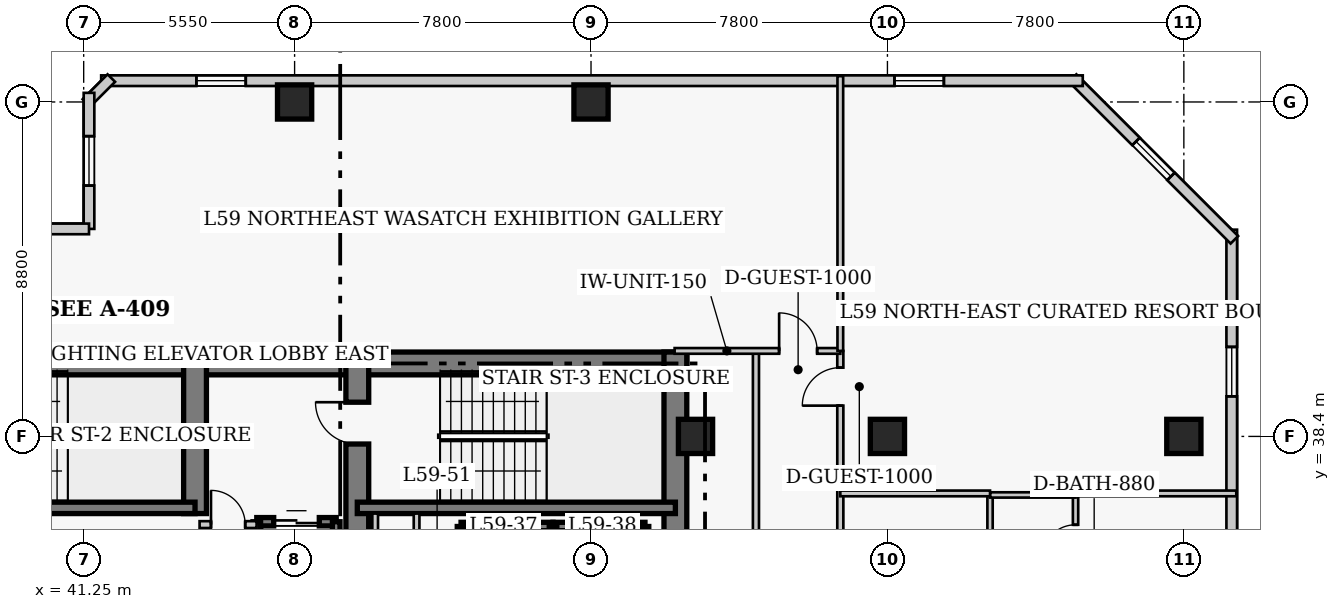
"""IFC4 building model, lengths in metres.
Left out: names, types, materials, properties, quantities, classifications, styles, units other than length and angle.
Written with IfcOpenShell. Run it as: python <this file> out.ifc"""

import sys

from ifc_helpers import new_model, si_unit, direction, frame, frame_2d, origin, origin_2d, place, context, subcontext, project, spatial, rectangle, extrude, element, fill, save


model = new_model("IFC4")
c1 = context("Model", 3, precision=1e-05, world=origin(), true_north=direction((0.0, 1.0)))
c2 = subcontext(c1, "Body", "Model", "MODEL_VIEW")
j1 = project(units=[si_unit("LENGTHUNIT", "METRE"), si_unit("PLANEANGLEUNIT", "RADIAN")], contexts=[c1])
p1 = place(None, origin())
s1 = spatial("IfcSite", under=j1, at=p1, CompositionType="ELEMENT")
p2 = place(p1, origin())
s2 = spatial("IfcBuilding", under=s1, at=p2, CompositionType="ELEMENT")
p3 = place(p2, frame((0.0, 0.0, 236.5)))
s3 = spatial("IfcBuildingStorey", under=s2, at=p3, CompositionType="ELEMENT", Elevation=236.5)
p4 = place(p3, frame((35.85, 40.32, 0.0), z_axis=(0.0, 0.0, 1.0), x_axis=(1.0, 0.0, 0.0)))
e1 = element("IfcWall", 1, at=p4, inside=s3, PredefinedType="SHEAR", context=c2, shape_type="SweptSolid", body=[
    extrude(rectangle(XDim=12.6, YDim=0.6, at=frame_2d((6.3, 0.0))), origin(), (0.0, 0.0, 1.0), 3.9),
])
p5 = place(p3, frame((48.45, 40.32, 0.0), z_axis=(0.0, 0.0, 1.0), x_axis=(1.0, 0.0, 0.0)))
e2 = element("IfcWall", 2, at=p5, inside=s3, PredefinedType="SHEAR", context=c2, shape_type="SweptSolid", body=[
    extrude(rectangle(XDim=8.67, YDim=0.6, at=frame_2d((4.335, 0.0))), origin(), (0.0, 0.0, 1.0), 3.9),
])
p6 = place(p3, frame((56.82, 27.05, 0.0), z_axis=(0.0, 0.0, 1.0), x_axis=(0.0, 1.0, 0.0)))
e3 = element("IfcWall", 3, at=p6, inside=s3, PredefinedType="SHEAR", context=c2, shape_type="SweptSolid", body=[
    extrude(rectangle(XDim=13.57, YDim=0.6, at=frame_2d((6.785, 0.0))), origin(), (0.0, 0.0, 1.0), 3.9),
])
p7 = place(p3, frame((44.18, 36.37, 0.0), z_axis=(0.0, 0.0, 1.0), x_axis=(0.0, 1.0, 0.0)))
e4 = element("IfcWall", 4, at=p7, inside=s3, PredefinedType="SHEAR", context=c2, shape_type="SweptSolid", body=[
    extrude(rectangle(XDim=3.95, YDim=0.6, at=frame_2d((1.975, 0.0))), origin(), (0.0, 0.0, 1.0), 3.9),
])
p8 = place(p3, frame((48.45, 32.45, 0.0), z_axis=(0.0, 0.0, 1.0), x_axis=(0.0, 1.0, 0.0)))
e5 = element("IfcWall", 5, at=p8, inside=s3, PredefinedType="SHEAR", context=c2, shape_type="SweptSolid", body=[
    extrude(rectangle(XDim=7.87, YDim=0.6, at=frame_2d((3.935, 0.0))), origin(), (0.0, 0.0, 1.0), 3.9),
])
p9 = place(p8, frame((5.75, 0.0, 0.0)))
e6 = element("IfcOpeningElement", 6, at=p9, cuts=e5, PredefinedType="OPENING", context=c2, shape_type="SweptSolid", body=[
    extrude(rectangle(XDim=1.1, YDim=2.15, at=frame_2d((0.55, 1.075))), frame((0.0, 0.31, 0.0), z_axis=(0.0, -1.0, 0.0), x_axis=(1.0, 0.0, 0.0)), (0.0, 0.0, 1.0), 0.62),
])
p10 = place(p3, frame((35.85, 36.52, 0.0), z_axis=(0.0, 0.0, 1.0), x_axis=(1.0, 0.0, 0.0)))
e7 = element("IfcWall", 7, at=p10, inside=s3, PredefinedType="SHEAR", context=c2, shape_type="SweptSolid", body=[
    extrude(rectangle(XDim=8.33, YDim=0.3, at=frame_2d((4.165, 0.0))), origin(), (0.0, 0.0, 1.0), 3.9),
])
p11 = place(p3, frame((48.45, 36.52, 0.0), z_axis=(0.0, 0.0, 1.0), x_axis=(1.0, 0.0, 0.0)))
e8 = element("IfcWall", 8, at=p11, inside=s3, PredefinedType="SHEAR", context=c2, shape_type="SweptSolid", body=[
    extrude(rectangle(XDim=8.37, YDim=0.3, at=frame_2d((4.185, 0.0))), origin(), (0.0, 0.0, 1.0), 3.9),
])
for number, where, z_axis, x_axis in (
    (9, (46.8, 47.2, 0.0), (0.0, 0.0, 1.0), (1.0, 0.0, 0.0)),
    (10, (54.6, 47.2, 0.0), (0.0, 0.0, 1.0), (1.0, 0.0, 0.0)),
    (11, (62.4, 38.4, 0.0), (0.0, 0.0, 1.0), (1.0, 0.0, 0.0)),
    (12, (70.2, 38.4, 0.0), (0.0, 0.0, 1.0), (1.0, 0.0, 0.0)),
    (13, (57.35, 38.4, 0.0), (0.0, 0.0, 1.0), (1.0, 0.0, 0.0)),
):
    element("IfcColumn", number, at=place(p3, frame(where, z_axis=z_axis, x_axis=x_axis)), inside=s3, PredefinedType="COLUMN", context=c2, shape_type="SweptSolid", body=[
        extrude(rectangle(XDim=0.9, YDim=0.9, at=origin_2d()), origin(), (0.0, 0.0, 1.0), 3.9),
    ])
p12 = place(p3, frame((71.46, 13.96, 0.0), z_axis=(0.0, 0.0, 1.0), x_axis=(0.0, 1.0, 0.0)))
e14 = element("IfcWall", 14, at=p12, inside=s3, PredefinedType="SOLIDWALL", context=c2, shape_type="SweptSolid", body=[
    extrude(rectangle(XDim=29.88, YDim=0.28, at=frame_2d((14.94, 0.0))), origin(), (0.0, 0.0, 1.0), 3.52),
])
p13 = place(p12, frame((3.085, 0.0, 0.85)))
e15 = element("IfcOpeningElement", 15, at=p13, cuts=e14, PredefinedType="OPENING", context=c2, shape_type="SweptSolid", body=[
    extrude(rectangle(XDim=1.3, YDim=1.7, at=frame_2d((0.65, 0.85))), frame((0.0, 0.15, 0.0), z_axis=(0.0, -1.0, 0.0), x_axis=(1.0, 0.0, 0.0)), (0.0, 0.0, 1.0), 0.3),
])
p14 = place(p12, frame((9.405, 0.0, 0.85)))
e16 = element("IfcOpeningElement", 16, at=p14, cuts=e14, PredefinedType="OPENING", context=c2, shape_type="SweptSolid", body=[
    extrude(rectangle(XDim=1.3, YDim=1.7, at=frame_2d((0.65, 0.85))), frame((0.0, 0.15, 0.0), z_axis=(0.0, -1.0, 0.0), x_axis=(1.0, 0.0, 0.0)), (0.0, 0.0, 1.0), 0.3),
])
p15 = place(p12, frame((18.025, 0.0, 0.85)))
e17 = element("IfcOpeningElement", 17, at=p15, cuts=e14, PredefinedType="OPENING", context=c2, shape_type="SweptSolid", body=[
    extrude(rectangle(XDim=1.3, YDim=1.7, at=frame_2d((0.65, 0.85))), frame((0.0, 0.15, 0.0), z_axis=(0.0, -1.0, 0.0), x_axis=(1.0, 0.0, 0.0)), (0.0, 0.0, 1.0), 0.3),
])
p16 = place(p12, frame((25.495, 0.0, 0.85)))
e18 = element("IfcOpeningElement", 18, at=p16, cuts=e14, PredefinedType="OPENING", context=c2, shape_type="SweptSolid", body=[
    extrude(rectangle(XDim=1.3, YDim=1.7, at=frame_2d((0.65, 0.85))), frame((0.0, 0.15, 0.0), z_axis=(0.0, -1.0, 0.0), x_axis=(1.0, 0.0, 0.0)), (0.0, 0.0, 1.0), 0.3),
])
p17 = place(p3, frame((71.529, 43.573, 0.0), z_axis=(0.0, 0.0, 1.0), x_axis=(-0.707106781187, 0.707106781187, 0.0)))
e19 = element("IfcWall", 19, at=p17, inside=s3, PredefinedType="SOLIDWALL", context=c2, shape_type="SweptSolid", body=[
    extrude(rectangle(XDim=6.02, YDim=0.28, at=frame_2d((3.01, 0.0))), origin(), (0.0, 0.0, 1.0), 3.52),
])
p18 = place(p17, frame((2.36, 0.0, 0.85)))
e20 = element("IfcOpeningElement", 20, at=p18, cuts=e19, PredefinedType="OPENING", context=c2, shape_type="SweptSolid", body=[
    extrude(rectangle(XDim=1.3, YDim=1.7, at=frame_2d((0.65, 0.85))), frame((0.0, 0.15, 0.0), z_axis=(0.0, -1.0, 0.0), x_axis=(1.0, 0.0, 0.0)), (0.0, 0.0, 1.0), 0.3),
])
p19 = place(p3, frame((67.54, 47.76, 0.0), z_axis=(0.0, 0.0, 1.0), x_axis=(-1.0, 0.0, 0.0)))
e21 = element("IfcWall", 21, at=p19, inside=s3, PredefinedType="SOLIDWALL", context=c2, shape_type="SweptSolid", body=[
    extrude(rectangle(XDim=25.83, YDim=0.28, at=frame_2d((12.915, 0.0))), origin(), (0.0, 0.0, 1.0), 3.52),
])
p20 = place(p19, frame((3.655, 0.0, 0.85)))
e22 = element("IfcOpeningElement", 22, at=p20, cuts=e21, PredefinedType="OPENING", context=c2, shape_type="SweptSolid", body=[
    extrude(rectangle(XDim=1.3, YDim=1.7, at=frame_2d((0.65, 0.85))), frame((0.0, 0.15, 0.0), z_axis=(0.0, -1.0, 0.0), x_axis=(1.0, 0.0, 0.0)), (0.0, 0.0, 1.0), 0.3),
])
p21 = place(p19, frame((22.025, 0.0, 0.85)))
e23 = element("IfcOpeningElement", 23, at=p21, cuts=e21, PredefinedType="OPENING", context=c2, shape_type="SweptSolid", body=[
    extrude(rectangle(XDim=1.3, YDim=1.7, at=frame_2d((0.65, 0.85))), frame((0.0, 0.15, 0.0), z_axis=(0.0, -1.0, 0.0), x_axis=(1.0, 0.0, 0.0)), (0.0, 0.0, 1.0), 0.3),
])
p22 = place(p3, frame((41.977, 47.829, 0.0), z_axis=(0.0, 0.0, 1.0), x_axis=(-0.706975312048, -0.707238225886, 0.0)))
e24 = element("IfcWall", 24, at=p22, inside=s3, PredefinedType="SOLIDWALL", context=c2, shape_type="SweptSolid", body=[
    extrude(rectangle(XDim=0.929, YDim=0.28, at=frame_2d((0.464, 0.0))), origin(), (0.0, 0.0, 1.0), 3.52),
])
p23 = place(p3, frame((41.39, 47.44, 0.0), z_axis=(0.0, 0.0, 1.0), x_axis=(0.0, -1.0, 0.0)))
e25 = element("IfcWall", 25, at=p23, inside=s3, PredefinedType="SOLIDWALL", context=c2, shape_type="SweptSolid", body=[
    extrude(rectangle(XDim=3.58, YDim=0.28, at=frame_2d((1.79, 0.0))), origin(), (0.0, 0.0, 1.0), 3.52),
])
p24 = place(p23, frame((1.14, 0.0, 0.85)))
e26 = element("IfcOpeningElement", 26, at=p24, cuts=e25, PredefinedType="OPENING", context=c2, shape_type="SweptSolid", body=[
    extrude(rectangle(XDim=1.3, YDim=1.7, at=frame_2d((0.65, 0.85))), frame((0.0, 0.15, 0.0), z_axis=(0.0, -1.0, 0.0), x_axis=(1.0, 0.0, 0.0)), (0.0, 0.0, 1.0), 0.3),
])
p25 = place(p3, frame((41.39, 43.86, 0.0), z_axis=(0.0, 0.0, 1.0), x_axis=(-1.0, 0.0, 0.0)))
e27 = element("IfcWall", 27, at=p25, inside=s3, PredefinedType="SOLIDWALL", context=c2, shape_type="SweptSolid", body=[
    extrude(rectangle(XDim=4.78, YDim=0.28, at=frame_2d((2.39, 0.0))), origin(), (0.0, 0.0, 1.0), 3.52),
])
p26 = place(p25, frame((1.74, 0.0, 0.85)))
e28 = element("IfcOpeningElement", 28, at=p26, cuts=e27, PredefinedType="OPENING", context=c2, shape_type="SweptSolid", body=[
    extrude(rectangle(XDim=1.3, YDim=1.7, at=frame_2d((0.65, 0.85))), frame((0.0, 0.15, 0.0), z_axis=(0.0, -1.0, 0.0), x_axis=(1.0, 0.0, 0.0)), (0.0, 0.0, 1.0), 0.3),
])
p27 = place(p3, frame((51.18, 36.03, 0.0), z_axis=(0.0, 0.0, 1.0), x_axis=(1.0, 0.0, 0.0)))
e29 = element("IfcWall", 29, at=p27, inside=s3, PredefinedType="SHEAR", context=c2, shape_type="SweptSolid", body=[
    extrude(rectangle(XDim=2.42, YDim=0.22, at=frame_2d((1.21, 0.0))), origin(), (0.0, 0.0, 1.0), 3.9),
])
p28 = place(p3, frame((51.18, 33.17, 0.0), z_axis=(0.0, 0.0, 1.0), x_axis=(0.0, 1.0, 0.0)))
e30 = element("IfcWall", 30, at=p28, inside=s3, PredefinedType="SHEAR", context=c2, shape_type="SweptSolid", body=[
    extrude(rectangle(XDim=2.86, YDim=0.2, at=frame_2d((1.43, 0.0))), origin(), (0.0, 0.0, 1.0), 3.9),
])
p29 = place(p3, frame((53.6, 36.03, 0.0), z_axis=(0.0, 0.0, 1.0), x_axis=(1.0, 0.0, 0.0)))
e31 = element("IfcWall", 31, at=p29, inside=s3, PredefinedType="SHEAR", context=c2, shape_type="SweptSolid", body=[
    extrude(rectangle(XDim=2.42, YDim=0.22, at=frame_2d((1.21, 0.0))), origin(), (0.0, 0.0, 1.0), 3.9),
])
for number, where, z_axis, x_axis in (
    (32, (53.6, 33.17, 0.0), (0.0, 0.0, 1.0), (0.0, 1.0, 0.0)),
    (33, (56.02, 33.17, 0.0), (0.0, 0.0, 1.0), (0.0, 1.0, 0.0)),
):
    element("IfcWall", number, at=place(p3, frame(where, z_axis=z_axis, x_axis=x_axis)), inside=s3, PredefinedType="SHEAR", context=c2, shape_type="SweptSolid", body=[
        extrude(rectangle(XDim=2.86, YDim=0.2, at=frame_2d((1.43, 0.0))), origin(), (0.0, 0.0, 1.0), 3.9),
    ])
p30 = place(p3, frame((45.805, 36.155, 0.0), z_axis=(0.0, 0.0, 1.0), x_axis=(1.0, 0.0, 0.0)))
e34 = element("IfcWall", 34, at=p30, inside=s3, PredefinedType="SHEAR", context=c2, shape_type="SweptSolid", body=[
    extrude(rectangle(XDim=2.09, YDim=0.22, at=frame_2d((1.045, 0.0))), origin(), (0.0, 0.0, 1.0), 3.9),
])
p31 = place(p30, frame((0.445, 0.0, 0.0)))
e35 = element("IfcOpeningElement", 35, at=p31, cuts=e34, PredefinedType="OPENING", context=c2, shape_type="SweptSolid", body=[
    extrude(rectangle(XDim=1.2, YDim=2.15, at=frame_2d((0.6, 1.075))), frame((0.0, 0.12, 0.0), z_axis=(0.0, -1.0, 0.0), x_axis=(1.0, 0.0, 0.0)), (0.0, 0.0, 1.0), 0.24),
])
p32 = place(p3, frame((45.805, 32.65, 0.0), z_axis=(0.0, 0.0, 1.0), x_axis=(0.0, 1.0, 0.0)))
e36 = element("IfcWall", 36, at=p32, inside=s3, PredefinedType="SHEAR", context=c2, shape_type="SweptSolid", body=[
    extrude(rectangle(XDim=3.505, YDim=0.2, at=frame_2d((1.752, 0.0))), origin(), (0.0, 0.0, 1.0), 3.9),
])
p33 = place(p3, frame((47.895, 33.245, 0.0), z_axis=(0.0, 0.0, 1.0), x_axis=(0.0, 1.0, 0.0)))
e37 = element("IfcWall", 37, at=p33, inside=s3, PredefinedType="SHEAR", context=c2, shape_type="SweptSolid", body=[
    extrude(rectangle(XDim=2.91, YDim=0.2, at=frame_2d((1.455, 0.0))), origin(), (0.0, 0.0, 1.0), 3.9),
])
p34 = place(p3, frame((44.3, 36.08, 0.0), z_axis=(0.0, 0.0, 1.0), x_axis=(1.0, 0.0, 0.0)))
e38 = element("IfcWall", 38, at=p34, inside=s3, PredefinedType="PARTITIONING", context=c2, shape_type="SweptSolid", body=[
    extrude(rectangle(XDim=1.5, YDim=0.18, at=frame_2d((0.75, 0.0))), origin(), (0.0, 0.0, 1.0), 3.52),
])
p35 = place(p34, frame((0.3, 0.0, 0.0)))
e39 = element("IfcOpeningElement", 39, at=p35, cuts=e38, PredefinedType="OPENING", context=c2, shape_type="SweptSolid", body=[
    extrude(rectangle(XDim=0.9, YDim=2.15, at=frame_2d((0.45, 1.075))), frame((0.0, 0.1, 0.0), z_axis=(0.0, -1.0, 0.0), x_axis=(1.0, 0.0, 0.0)), (0.0, 0.0, 1.0), 0.2),
])
for number, where, z_axis, x_axis in (
    (40, (48.92, 32.75, 0.0), (0.0, 0.0, 1.0), (0.0, 1.0, 0.0)),
    (41, (50.01, 32.75, 0.0), (0.0, 0.0, 1.0), (0.0, 1.0, 0.0)),
):
    element("IfcWall", number, at=place(p3, frame(where, z_axis=z_axis, x_axis=x_axis)), inside=s3, PredefinedType="PARTITIONING", context=c2, shape_type="SweptSolid", body=[
        extrude(rectangle(XDim=3.62, YDim=0.15, at=frame_2d((1.81, 0.0))), origin(), (0.0, 0.0, 1.0), 3.52),
    ])
p36 = place(p3, frame((61.16, 25.1, 0.0), z_axis=(0.0, 0.0, 1.0), x_axis=(0.0, 1.0, 0.0)))
e42 = element("IfcWall", 42, at=p36, inside=s3, PredefinedType="PARTITIONING", context=c2, shape_type="SweptSolid", body=[
    extrude(rectangle(XDim=15.55, YDim=0.16, at=frame_2d((7.775, 0.0))), origin(), (0.0, 0.0, 1.0), 3.52),
])
p37 = place(p36, frame((5.425, 0.0, 0.0)))
e43 = element("IfcOpeningElement", 43, at=p37, cuts=e42, PredefinedType="OPENING", context=c2, shape_type="SweptSolid", body=[
    extrude(rectangle(XDim=0.95, YDim=2.1, at=frame_2d((0.475, 1.05))), frame((0.0, 0.09, 0.0), z_axis=(0.0, -1.0, 0.0), x_axis=(1.0, 0.0, 0.0)), (0.0, 0.0, 1.0), 0.18),
])
p38 = place(p36, frame((14.11, 0.0, 0.0)))
e44 = element("IfcOpeningElement", 44, at=p38, cuts=e42, PredefinedType="OPENING", context=c2, shape_type="SweptSolid", body=[
    extrude(rectangle(XDim=1.0, YDim=2.15, at=frame_2d((0.5, 1.075))), frame((0.0, 0.09, 0.0), z_axis=(0.0, -1.0, 0.0), x_axis=(1.0, 0.0, 0.0)), (0.0, 0.0, 1.0), 0.18),
])
p39 = place(p3, frame((58.94, 27.26, 0.0), z_axis=(0.0, 0.0, 1.0), x_axis=(0.0, 1.0, 0.0)))
e45 = element("IfcWall", 45, at=p39, inside=s3, PredefinedType="PARTITIONING", context=c2, shape_type="SweptSolid", body=[
    extrude(rectangle(XDim=13.39, YDim=0.16, at=frame_2d((6.695, 0.0))), origin(), (0.0, 0.0, 1.0), 3.52),
])
p40 = place(p3, frame((56.8, 40.65, 0.0), z_axis=(0.0, 0.0, 1.0), x_axis=(1.0, 0.0, 0.0)))
e46 = element("IfcWall", 46, at=p40, inside=s3, PredefinedType="PARTITIONING", context=c2, shape_type="SweptSolid", body=[
    extrude(rectangle(XDim=4.36, YDim=0.15, at=frame_2d((2.18, 0.0))), origin(), (0.0, 0.0, 1.0), 3.52),
])
p41 = place(p40, frame((2.75, 0.0, 0.0)))
e47 = element("IfcOpeningElement", 47, at=p41, cuts=e46, PredefinedType="OPENING", context=c2, shape_type="SweptSolid", body=[
    extrude(rectangle(XDim=1.0, YDim=2.15, at=frame_2d((0.5, 1.075))), frame((0.0, 0.085, 0.0), z_axis=(0.0, -1.0, 0.0), x_axis=(1.0, 0.0, 0.0)), (0.0, 0.0, 1.0), 0.17),
])
p42 = place(p3, frame((61.16, 40.65, 0.0), z_axis=(0.0, 0.0, 1.0), x_axis=(0.0, 1.0, 0.0)))
e48 = element("IfcWall", 48, at=p42, inside=s3, PredefinedType="PARTITIONING", context=c2, shape_type="SweptSolid", body=[
    extrude(rectangle(XDim=7.23, YDim=0.15, at=frame_2d((3.615, 0.0))), origin(), (0.0, 0.0, 1.0), 3.52),
])
p43 = place(p3, frame((65.1, 34.41, 0.0), z_axis=(0.0, 0.0, 1.0), x_axis=(0.0, 1.0, 0.0)))
e49 = element("IfcWall", 49, at=p43, inside=s3, PredefinedType="PLUMBINGWALL", context=c2, shape_type="SweptSolid", body=[
    extrude(rectangle(XDim=2.45, YDim=0.14, at=frame_2d((1.225, 0.0))), origin(), (0.0, 0.0, 1.0), 3.52),
])
p44 = place(p3, frame((67.35, 34.41, 0.0), z_axis=(0.0, 0.0, 1.0), x_axis=(0.0, 1.0, 0.0)))
e50 = element("IfcWall", 50, at=p44, inside=s3, PredefinedType="PLUMBINGWALL", context=c2, shape_type="SweptSolid", body=[
    extrude(rectangle(XDim=2.45, YDim=0.14, at=frame_2d((1.225, 0.0))), origin(), (0.0, 0.0, 1.0), 3.52),
])
p45 = place(p44, frame((0.785, 0.0, 0.0)))
e51 = element("IfcOpeningElement", 51, at=p45, cuts=e50, PredefinedType="OPENING", context=c2, shape_type="SweptSolid", body=[
    extrude(rectangle(XDim=0.88, YDim=2.05, at=frame_2d((0.44, 1.025))), frame((0.0, 0.08, 0.0), z_axis=(0.0, -1.0, 0.0), x_axis=(1.0, 0.0, 0.0)), (0.0, 0.0, 1.0), 0.16),
])
p46 = place(p3, frame((65.1, 36.86, 0.0), z_axis=(0.0, 0.0, 1.0), x_axis=(1.0, 0.0, 0.0)))
e52 = element("IfcWall", 52, at=p46, inside=s3, PredefinedType="PLUMBINGWALL", context=c2, shape_type="SweptSolid", body=[
    extrude(rectangle(XDim=2.25, YDim=0.14, at=frame_2d((1.125, 0.0))), origin(), (0.0, 0.0, 1.0), 3.52),
])
p47 = place(p3, frame((61.16, 36.9, 0.0), z_axis=(0.0, 0.0, 1.0), x_axis=(1.0, 0.0, 0.0)))
e53 = element("IfcWall", 53, at=p47, inside=s3, PredefinedType="PARTITIONING", context=c2, shape_type="SweptSolid", body=[
    extrude(rectangle(XDim=3.94, YDim=0.15, at=frame_2d((1.97, 0.0))), origin(), (0.0, 0.0, 1.0), 3.52),
])
p48 = place(p3, frame((67.35, 36.9, 0.0), z_axis=(0.0, 0.0, 1.0), x_axis=(1.0, 0.0, 0.0)))
e54 = element("IfcWall", 54, at=p48, inside=s3, PredefinedType="PARTITIONING", context=c2, shape_type="SweptSolid", body=[
    extrude(rectangle(XDim=4.23, YDim=0.15, at=frame_2d((2.115, 0.0))), origin(), (0.0, 0.0, 1.0), 3.52),
])
p49 = place(p16, origin())
e55 = element("IfcWindow", 55, at=p49, inside=s3, PartitioningType="SINGLE_PANEL", PredefinedType="WINDOW", context=c2, shape_type="SweptSolid", body=[
    extrude(rectangle(XDim=1.3, YDim=1.7, at=frame_2d((0.65, 0.85))), frame((0.0, 0.03, 0.0), z_axis=(0.0, -1.0, 0.0), x_axis=(1.0, 0.0, 0.0)), (0.0, 0.0, 1.0), 0.06),
])
fill(e18, e55)
p50 = place(p18, origin())
e56 = element("IfcWindow", 56, at=p50, inside=s3, PartitioningType="SINGLE_PANEL", PredefinedType="WINDOW", context=c2, shape_type="SweptSolid", body=[
    extrude(rectangle(XDim=1.3, YDim=1.7, at=frame_2d((0.65, 0.85))), frame((0.0, 0.03, 0.0), z_axis=(0.0, -1.0, 0.0), x_axis=(1.0, 0.0, 0.0)), (0.0, 0.0, 1.0), 0.06),
])
fill(e20, e56)
p51 = place(p20, origin())
e57 = element("IfcWindow", 57, at=p51, inside=s3, PartitioningType="SINGLE_PANEL", PredefinedType="WINDOW", context=c2, shape_type="SweptSolid", body=[
    extrude(rectangle(XDim=1.3, YDim=1.7, at=frame_2d((0.65, 0.85))), frame((0.0, 0.03, 0.0), z_axis=(0.0, -1.0, 0.0), x_axis=(1.0, 0.0, 0.0)), (0.0, 0.0, 1.0), 0.06),
])
fill(e22, e57)
p52 = place(p21, origin())
e58 = element("IfcWindow", 58, at=p52, inside=s3, PartitioningType="SINGLE_PANEL", PredefinedType="WINDOW", context=c2, shape_type="SweptSolid", body=[
    extrude(rectangle(XDim=1.3, YDim=1.7, at=frame_2d((0.65, 0.85))), frame((0.0, 0.03, 0.0), z_axis=(0.0, -1.0, 0.0), x_axis=(1.0, 0.0, 0.0)), (0.0, 0.0, 1.0), 0.06),
])
fill(e23, e58)
p53 = place(p24, origin())
e59 = element("IfcWindow", 59, at=p53, inside=s3, PartitioningType="SINGLE_PANEL", PredefinedType="WINDOW", context=c2, shape_type="SweptSolid", body=[
    extrude(rectangle(XDim=1.3, YDim=1.7, at=frame_2d((0.65, 0.85))), frame((0.0, 0.03, 0.0), z_axis=(0.0, -1.0, 0.0), x_axis=(1.0, 0.0, 0.0)), (0.0, 0.0, 1.0), 0.06),
])
fill(e26, e59)
p54 = place(p31, origin())
e60 = element("IfcDoor", 60, at=p54, inside=s3, OperationType="DOUBLE_DOOR_SLIDING", PredefinedType="DOOR", context=c2, shape_type="SweptSolid", body=[
    extrude(rectangle(XDim=1.2, YDim=2.15, at=frame_2d((0.6, 1.075))), frame((0.0, 0.025, 0.0), z_axis=(0.0, -1.0, 0.0), x_axis=(1.0, 0.0, 0.0)), (0.0, 0.0, 1.0), 0.05),
])
fill(e35, e60)
p55 = place(p35, origin())
e61 = element("IfcDoor", 61, at=p55, inside=s3, OperationType="SINGLE_SWING_LEFT", PredefinedType="DOOR", context=c2, shape_type="SweptSolid", body=[
    extrude(rectangle(XDim=0.9, YDim=2.15, at=frame_2d((0.45, 1.075))), frame((0.0, 0.025, 0.0), z_axis=(0.0, -1.0, 0.0), x_axis=(1.0, 0.0, 0.0)), (0.0, 0.0, 1.0), 0.05),
])
fill(e39, e61)
p56 = place(p41, origin())
e62 = element("IfcDoor", 62, at=p56, inside=s3, OperationType="SINGLE_SWING_LEFT", PredefinedType="DOOR", context=c2, shape_type="SweptSolid", body=[
    extrude(rectangle(XDim=1.0, YDim=2.15, at=frame_2d((0.5, 1.075))), frame((0.0, 0.025, 0.0), z_axis=(0.0, -1.0, 0.0), x_axis=(1.0, 0.0, 0.0)), (0.0, 0.0, 1.0), 0.05),
])
fill(e47, e62)
p57 = place(p45, origin())
e63 = element("IfcDoor", 63, at=p57, inside=s3, OperationType="SINGLE_SWING_LEFT", PredefinedType="DOOR", context=c2, shape_type="SweptSolid", body=[
    extrude(rectangle(XDim=0.88, YDim=2.05, at=frame_2d((0.44, 1.025))), frame((0.0, 0.025, 0.0), z_axis=(0.0, -1.0, 0.0), x_axis=(1.0, 0.0, 0.0)), (0.0, 0.0, 1.0), 0.05),
])
fill(e51, e63)
p58 = place(p38, origin())
e64 = element("IfcDoor", 64, at=p58, inside=s3, OperationType="SINGLE_SWING_LEFT", PredefinedType="DOOR", context=c2, shape_type="SweptSolid", body=[
    extrude(rectangle(XDim=1.0, YDim=2.15, at=frame_2d((0.5, 1.075))), frame((0.0, 0.025, 0.0), z_axis=(0.0, -1.0, 0.0), x_axis=(1.0, 0.0, 0.0)), (0.0, 0.0, 1.0), 0.05),
])
fill(e44, e64)
p59 = place(p9, origin())
e65 = element("IfcDoor", 65, at=p59, inside=s3, OperationType="SINGLE_SWING_RIGHT", PredefinedType="DOOR", context=c2, shape_type="SweptSolid", body=[
    extrude(rectangle(XDim=1.1, YDim=2.15, at=frame_2d((0.55, 1.075))), frame((0.0, 0.025, 0.0), z_axis=(0.0, -1.0, 0.0), x_axis=(1.0, 0.0, 0.0)), (0.0, 0.0, 1.0), 0.05),
])
fill(e6, e65)
save(model, sys.argv[1])
